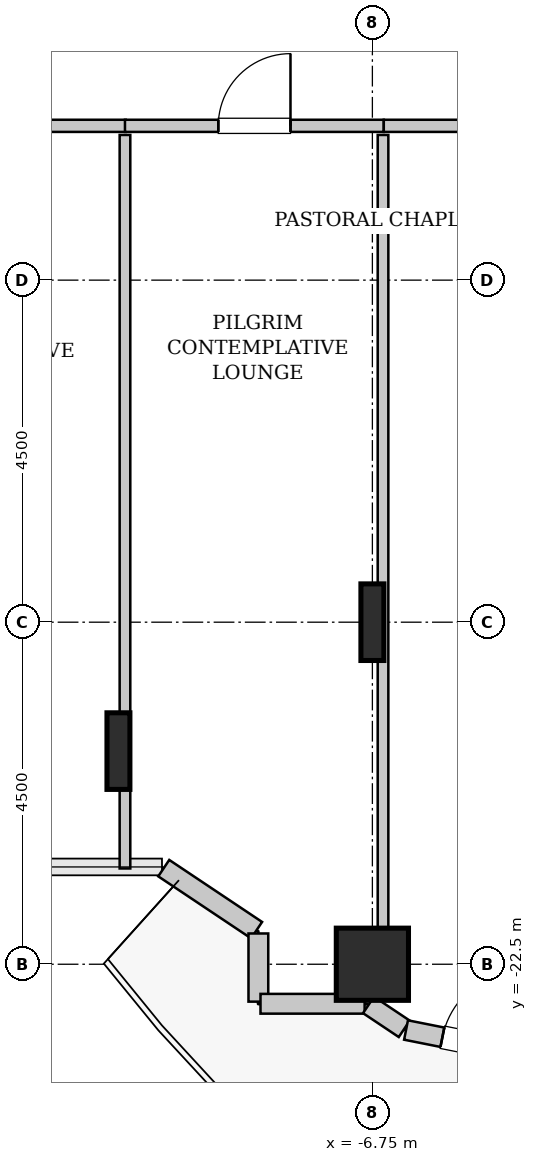
"""IFC4 building model, lengths in metres.
Left out: names, types, materials, properties, quantities, classifications, styles, units other than length and angle.
Written with IfcOpenShell. Run it as: python <this file> out.ifc"""

import sys

from ifc_helpers import new_model, si_unit, direction, frame, frame_2d, origin, origin_2d, place, context, subcontext, project, spatial, rectangle, hollow_rectangle, i_section, extrude, source, transform, mapped, element, fill, save


model = new_model("IFC4")
c1 = context("Model", 3, precision=1e-05, world=origin(), true_north=direction((0.0, 1.0)))
c2 = subcontext(c1, "Body", "Model", "MODEL_VIEW")
j1 = project(units=[si_unit("LENGTHUNIT", "METRE"), si_unit("PLANEANGLEUNIT", "RADIAN")], contexts=[c1])
p1 = place(None, origin())
s1 = spatial("IfcSite", under=j1, at=p1, CompositionType="ELEMENT")
p2 = place(p1, origin())
s2 = spatial("IfcBuilding", under=s1, at=p2, CompositionType="ELEMENT")
p3 = place(p2, frame((0.0, 0.0, 78.6)))
s3 = spatial("IfcBuildingStorey", under=s2, at=p3, CompositionType="ELEMENT", Elevation=78.6)
m1 = source(origin(), c2, "Body", "SweptSolid", [
    extrude(i_section(OverallWidth=0.302, OverallDepth=1.008, WebThickness=0.021, FlangeThickness=0.04, FilletRadius=0.03, at=origin_2d()), origin(), (0.0, 0.0, 1.0), 3.8),
])
p4 = place(p3, frame((-10.091, -19.696, 0.0), z_axis=(0.0, 0.0, 1.0), x_axis=(1.0, 0.0, 0.0)))
e1 = element("IfcColumn", 1, at=p4, inside=s3, PredefinedType="COLUMN", context=c2, shape_type="MappedRepresentation", body=[
    mapped(m1, transform((0.0, 0.0, 0.0), x_axis=(1.0, 0.0, 0.0), y_axis=(0.0, 1.0, 0.0), z_axis=(0.0, 0.0, 1.0), scale=1.0)),
])
m2 = source(origin(), c2, "Body", "SweptSolid", [
    extrude(hollow_rectangle(XDim=0.95, YDim=0.95, WallThickness=0.045, InnerFilletRadius=0.045, OuterFilletRadius=0.09, at=origin_2d()), origin(), (0.0, 0.0, 1.0), 3.8),
])
p5 = place(p3, frame((-6.75, -22.5, 0.0), z_axis=(0.0, 0.0, 1.0), x_axis=(1.0, 0.0, 0.0)))
e2 = element("IfcColumn", 2, at=p5, inside=s3, PredefinedType="COLUMN", context=c2, shape_type="MappedRepresentation", body=[
    mapped(m2, transform((0.0, 0.0, 0.0), x_axis=(1.0, 0.0, 0.0), y_axis=(0.0, 1.0, 0.0), z_axis=(0.0, 0.0, 1.0), scale=1.0)),
])
p6 = place(p3, frame((-6.75, -18.0, 0.0), z_axis=(0.0, 0.0, 1.0), x_axis=(1.0, 0.0, 0.0)))
e3 = element("IfcColumn", 3, at=p6, inside=s3, PredefinedType="COLUMN", context=c2, shape_type="MappedRepresentation", body=[
    mapped(m1, transform((0.0, 0.0, 0.0), x_axis=(1.0, 0.0, 0.0), y_axis=(0.0, 1.0, 0.0), z_axis=(0.0, 0.0, 1.0), scale=1.0)),
])
m3 = source(origin(), c2, "Body", "SweptSolid", [
    extrude(rectangle(XDim=1.469, YDim=0.26, at=frame_2d((0.734, 0.0))), origin(), (0.0, 0.0, 1.0), 3.55),
])
p7 = place(p3, frame((-9.495, -21.236, 0.0), z_axis=(0.0, 0.0, 1.0), x_axis=(0.831461760506, -0.555581983884, 0.0)))
e4 = element("IfcWall", 4, at=p7, inside=s3, PredefinedType="SOLIDWALL", context=c2, shape_type="MappedRepresentation", body=[
    mapped(m3, transform((0.0, 0.0, 0.0), x_axis=(1.0, 0.0, 0.0), y_axis=(0.0, 1.0, 0.0), z_axis=(0.0, 0.0, 1.0), scale=1.0)),
])
m4 = source(origin(), c2, "Body", "SweptSolid", [
    extrude(rectangle(XDim=0.897, YDim=0.26, at=frame_2d((0.448, 0.0))), origin(), (0.0, 0.0, 1.0), 3.55),
])
p8 = place(p3, frame((-8.25, -22.095, 0.0), z_axis=(0.0, 0.0, 1.0), x_axis=(0.0, -1.0, 0.0)))
e5 = element("IfcWall", 5, at=p8, inside=s3, PredefinedType="SOLIDWALL", context=c2, shape_type="MappedRepresentation", body=[
    mapped(m4, transform((0.0, 0.0, 0.0), x_axis=(1.0, 0.0, 0.0), y_axis=(0.0, 1.0, 0.0), z_axis=(0.0, 0.0, 1.0), scale=1.0)),
])
m5 = source(origin(), c2, "Body", "SweptSolid", [
    extrude(rectangle(XDim=1.37, YDim=0.26, at=frame_2d((0.685, 0.0))), origin(), (0.0, 0.0, 1.0), 3.55),
])
p9 = place(p3, frame((-8.222, -23.02, 0.0), z_axis=(0.0, 0.0, 1.0), x_axis=(1.0, 0.0, 0.0)))
e6 = element("IfcWall", 6, at=p9, inside=s3, PredefinedType="SOLIDWALL", context=c2, shape_type="MappedRepresentation", body=[
    mapped(m5, transform((0.0, 0.0, 0.0), x_axis=(1.0, 0.0, 0.0), y_axis=(0.0, 1.0, 0.0), z_axis=(0.0, 0.0, 1.0), scale=1.0)),
])
m6 = source(origin(), c2, "Body", "SweptSolid", [
    extrude(rectangle(XDim=0.565, YDim=0.26, at=frame_2d((0.283, 0.0))), origin(), (0.0, 0.0, 1.0), 3.55),
])
p10 = place(p3, frame((-6.801, -23.036, 0.0), z_axis=(0.0, 0.0, 1.0), x_axis=(0.831651492666, -0.555297933317, 0.0)))
e7 = element("IfcWall", 7, at=p10, inside=s3, PredefinedType="SOLIDWALL", context=c2, shape_type="MappedRepresentation", body=[
    mapped(m6, transform((0.0, 0.0, 0.0), x_axis=(1.0, 0.0, 0.0), y_axis=(0.0, 1.0, 0.0), z_axis=(0.0, 0.0, 1.0), scale=1.0)),
])
m7 = source(origin(), c2, "Body", "SweptSolid", [
    extrude(rectangle(XDim=4.137, YDim=0.26, at=frame_2d((2.068, 0.0))), origin(), (0.0, 0.0, 1.0), 3.55),
])
p11 = place(p3, frame((-6.307, -23.365, 0.0), z_axis=(0.0, 0.0, 1.0), x_axis=(0.980782170794, -0.195105954428, 0.0)))
e8 = element("IfcWall", 8, at=p11, inside=s3, PredefinedType="SOLIDWALL", context=c2, shape_type="MappedRepresentation", body=[
    mapped(m7, transform((0.0, 0.0, 0.0), x_axis=(1.0, 0.0, 0.0), y_axis=(0.0, 1.0, 0.0), z_axis=(0.0, 0.0, 1.0), scale=1.0)),
])
p12 = place(p11, frame((0.488, 0.0, 0.0)))
e9 = element("IfcOpeningElement", 9, at=p12, cuts=e8, PredefinedType="OPENING", context=c2, shape_type="SweptSolid", body=[
    extrude(rectangle(XDim=1.1, YDim=2.2, at=frame_2d((0.55, 1.1))), frame((0.0, 0.14, 0.0), z_axis=(0.0, -1.0, 0.0), x_axis=(1.0, 0.0, 0.0)), (0.0, 0.0, 1.0), 0.28),
])
m8 = source(origin(), c2, "Body", "SweptSolid", [
    extrude(rectangle(XDim=3.625, YDim=0.16, at=frame_2d((1.812, 0.0))), origin(), (0.0, 0.0, 1.0), 3.535),
])
p13 = place(p3, frame((-13.62, -11.47, 0.0), z_axis=(0.0, 0.0, 1.0), x_axis=(1.0, 0.0, 0.0)))
e10 = element("IfcWall", 10, at=p13, inside=s3, PredefinedType="PARTITIONING", context=c2, shape_type="MappedRepresentation", body=[
    mapped(m8, transform((0.0, 0.0, 0.0), x_axis=(1.0, 0.0, 0.0), y_axis=(0.0, 1.0, 0.0), z_axis=(0.0, 0.0, 1.0), scale=1.0)),
])
p14 = place(p13, frame((1.337, 0.0, 0.0)))
e11 = element("IfcOpeningElement", 11, at=p14, cuts=e10, PredefinedType="OPENING", context=c2, shape_type="SweptSolid", body=[
    extrude(rectangle(XDim=0.95, YDim=2.1, at=frame_2d((0.475, 1.05))), frame((0.0, 0.09, 0.0), z_axis=(0.0, -1.0, 0.0), x_axis=(1.0, 0.0, 0.0)), (0.0, 0.0, 1.0), 0.18),
])
m9 = source(origin(), c2, "Body", "SweptSolid", [
    extrude(rectangle(XDim=9.65, YDim=0.14, at=frame_2d((4.825, 0.0))), origin(), (0.0, 0.0, 1.0), 3.535),
])
p15 = place(p3, frame((-10.005, -21.24, 0.0), z_axis=(0.0, 0.0, 1.0), x_axis=(0.0, 1.0, 0.0)))
e12 = element("IfcWall", 12, at=p15, inside=s3, PredefinedType="PARTITIONING", context=c2, shape_type="MappedRepresentation", body=[
    mapped(m9, transform((0.0, 0.0, 0.0), x_axis=(1.0, 0.0, 0.0), y_axis=(0.0, 1.0, 0.0), z_axis=(0.0, 0.0, 1.0), scale=1.0)),
])
m10 = source(origin(), c2, "Body", "SweptSolid", [
    extrude(rectangle(XDim=3.405, YDim=0.16, at=frame_2d((1.702, 0.0))), origin(), (0.0, 0.0, 1.0), 3.535),
])
p16 = place(p3, frame((-10.005, -11.47, 0.0), z_axis=(0.0, 0.0, 1.0), x_axis=(1.0, 0.0, 0.0)))
e13 = element("IfcWall", 13, at=p16, inside=s3, PredefinedType="PARTITIONING", context=c2, shape_type="MappedRepresentation", body=[
    mapped(m10, transform((0.0, 0.0, 0.0), x_axis=(1.0, 0.0, 0.0), y_axis=(0.0, 1.0, 0.0), z_axis=(0.0, 0.0, 1.0), scale=1.0)),
])
p17 = place(p16, frame((1.228, 0.0, 0.0)))
e14 = element("IfcOpeningElement", 14, at=p17, cuts=e13, PredefinedType="OPENING", context=c2, shape_type="SweptSolid", body=[
    extrude(rectangle(XDim=0.95, YDim=2.1, at=frame_2d((0.475, 1.05))), frame((0.0, 0.09, 0.0), z_axis=(0.0, -1.0, 0.0), x_axis=(1.0, 0.0, 0.0)), (0.0, 0.0, 1.0), 0.18),
])
m11 = source(origin(), c2, "Body", "SweptSolid", [
    extrude(rectangle(XDim=11.371, YDim=0.14, at=frame_2d((5.686, 0.0))), origin(), (0.0, 0.0, 1.0), 2.825),
])
p18 = place(p3, frame((-6.61, -22.961, 0.0), z_axis=(0.0, 0.0, 1.0), x_axis=(0.0, 1.0, 0.0)))
e15 = element("IfcWall", 15, at=p18, inside=s3, PredefinedType="PARTITIONING", context=c2, shape_type="MappedRepresentation", body=[
    mapped(m11, transform((0.0, 0.0, 0.0), x_axis=(1.0, 0.0, 0.0), y_axis=(0.0, 1.0, 0.0), z_axis=(0.0, 0.0, 1.0), scale=1.0)),
])
m12 = source(origin(), c2, "Body", "SweptSolid", [
    extrude(rectangle(XDim=3.405, YDim=0.16, at=frame_2d((1.703, 0.0))), origin(), (0.0, 0.0, 1.0), 3.535),
])
p19 = place(p3, frame((-6.6, -11.47, 0.0), z_axis=(0.0, 0.0, 1.0), x_axis=(1.0, 0.0, 0.0)))
e16 = element("IfcWall", 16, at=p19, inside=s3, PredefinedType="PARTITIONING", context=c2, shape_type="MappedRepresentation", body=[
    mapped(m12, transform((0.0, 0.0, 0.0), x_axis=(1.0, 0.0, 0.0), y_axis=(0.0, 1.0, 0.0), z_axis=(0.0, 0.0, 1.0), scale=1.0)),
])
p20 = place(p19, frame((1.228, 0.0, 0.0)))
e17 = element("IfcOpeningElement", 17, at=p20, cuts=e16, PredefinedType="OPENING", context=c2, shape_type="SweptSolid", body=[
    extrude(rectangle(XDim=0.95, YDim=2.1, at=frame_2d((0.475, 1.05))), frame((0.0, 0.09, 0.0), z_axis=(0.0, -1.0, 0.0), x_axis=(1.0, 0.0, 0.0)), (0.0, 0.0, 1.0), 0.18),
])
m13 = source(origin(), c2, "Body", "SweptSolid", [
    extrude(rectangle(XDim=1.1, YDim=2.2, at=frame_2d((0.55, 1.1))), frame((0.0, 0.025, 0.0), z_axis=(0.0, -1.0, 0.0), x_axis=(1.0, 0.0, 0.0)), (0.0, 0.0, 1.0), 0.05),
])
p21 = place(p12, origin())
e18 = element("IfcDoor", 18, at=p21, inside=s3, OperationType="SINGLE_SWING_RIGHT", PredefinedType="DOOR", context=c2, shape_type="MappedRepresentation", body=[
    mapped(m13, transform((0.0, 0.0, 0.0), x_axis=(1.0, 0.0, 0.0), y_axis=(0.0, 1.0, 0.0), z_axis=(0.0, 0.0, 1.0), scale=1.0)),
])
fill(e9, e18)
m14 = source(origin(), c2, "Body", "SweptSolid", [
    extrude(rectangle(XDim=0.95, YDim=2.1, at=frame_2d((0.475, 1.05))), frame((0.0, 0.025, 0.0), z_axis=(0.0, -1.0, 0.0), x_axis=(1.0, 0.0, 0.0)), (0.0, 0.0, 1.0), 0.05),
])
p22 = place(p17, origin())
e19 = element("IfcDoor", 19, at=p22, inside=s3, OperationType="SINGLE_SWING_RIGHT", PredefinedType="DOOR", context=c2, shape_type="MappedRepresentation", body=[
    mapped(m14, transform((0.0, 0.0, 0.0), x_axis=(1.0, 0.0, 0.0), y_axis=(0.0, 1.0, 0.0), z_axis=(0.0, 0.0, 1.0), scale=1.0)),
])
fill(e14, e19)
save(model, sys.argv[1])
